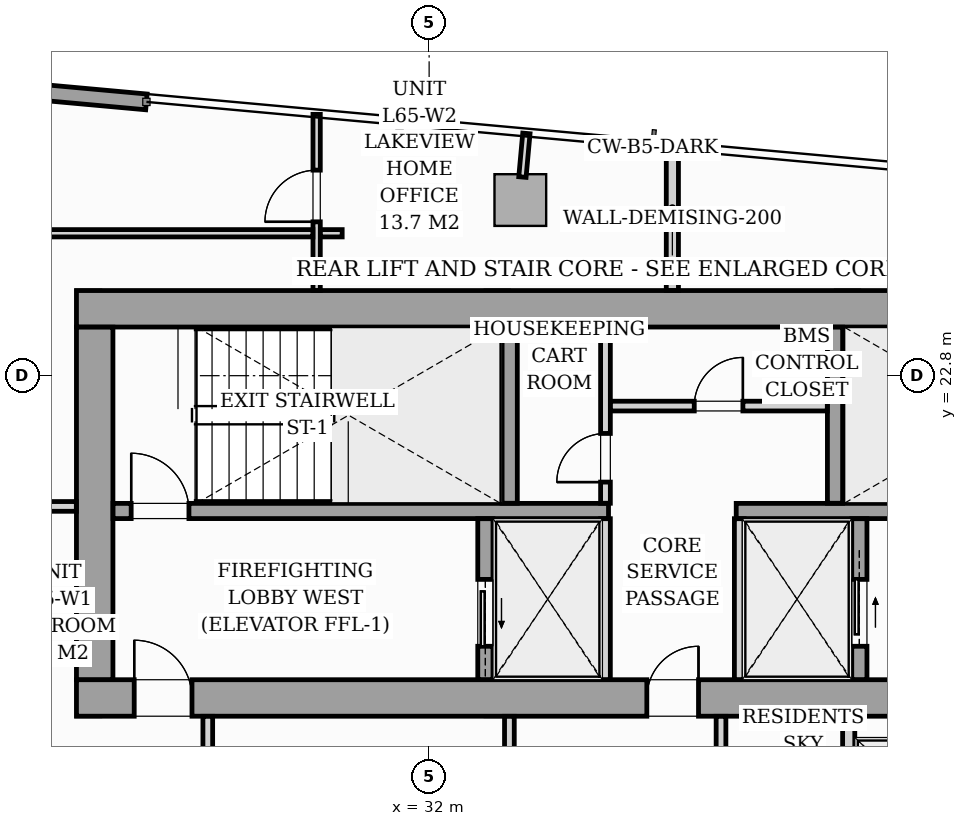
"""IFC4 building model, lengths in metres.
Left out: names, types, materials, properties, quantities, classifications, styles, units other than length and angle.
Written with IfcOpenShell. Run it as: python <this file> out.ifc"""

import sys

from ifc_helpers import new_model, si_unit, direction, frame, frame_2d, origin, origin_2d, place, context, subcontext, project, spatial, rectangle, i_section, extrude, source, transform, mapped, element, fill, save


model = new_model("IFC4")
c1 = context("Model", 3, precision=1e-05, world=origin(), true_north=direction((0.0, 1.0)))
c2 = subcontext(c1, "Body", "Model", "MODEL_VIEW")
j1 = project(units=[si_unit("LENGTHUNIT", "METRE"), si_unit("PLANEANGLEUNIT", "RADIAN")], contexts=[c1])
p1 = place(None, origin())
s1 = spatial("IfcSite", under=j1, at=p1, CompositionType="ELEMENT")
p2 = place(p1, origin())
s2 = spatial("IfcBuilding", under=s1, at=p2, CompositionType="ELEMENT")
p3 = place(p2, frame((0.0, 0.0, 226.5)))
s3 = spatial("IfcBuildingStorey", under=s2, at=p3, CompositionType="ELEMENT", Elevation=226.5)
m1 = source(origin(), c2, "Body", "SweptSolid", [
    extrude(i_section(OverallWidth=0.409, OverallDepth=0.425, WebThickness=0.033, FlangeThickness=0.052, FilletRadius=0.018, at=origin_2d()), origin(), (0.0, 0.0, 1.0), 3.296),
])
for number, where, z_axis, x_axis in (
    (1, (26.4, 17.4, 0.002), (0.0, 0.0, 1.0), (1.0, 0.0, 0.0)),
    (2, (33.12, 17.4, 0.002), (0.0, 0.0, 1.0), (1.0, 0.0, 0.0)),
    (3, (38.88, 17.4, 0.002), (0.0, 0.0, 1.0), (1.0, 0.0, 0.0)),
    (4, (26.4, 24.0, 0.002), (0.0, 0.0, 1.0), (1.0, 0.0, 0.0)),
    (5, (33.12, 24.0, 0.002), (0.0, 0.0, 1.0), (1.0, 0.0, 0.0)),
    (6, (38.88, 24.0, 0.002), (0.0, 0.0, 1.0), (1.0, 0.0, 0.0)),
):
    element("IfcColumn", number, at=place(p3, frame(where, z_axis=z_axis, x_axis=x_axis)), inside=s3, PredefinedType="PILASTER", context=c2, shape_type="MappedRepresentation", body=[
        mapped(m1, transform((0.0, 0.0, 0.0), scale=1.0)),
    ])
m2 = source(origin(), c2, "Body", "SweptSolid", [
    extrude(rectangle(XDim=0.85, YDim=0.85, at=origin_2d()), origin(), (0.0, 0.0, 1.0), 3.296),
])
p4 = place(p3, frame((33.5, 25.688, 0.002), z_axis=(0.0, 0.0, 1.0), x_axis=(0.995884398616, -0.090632580198, 0.0)))
e7 = element("IfcColumn", 7, at=p4, inside=s3, PredefinedType="COLUMN", context=c2, shape_type="MappedRepresentation", body=[
    mapped(m2, transform((0.0, 0.0, 0.0), scale=1.0)),
])
p5 = place(p3, frame((12.781, 28.628, 0.0), z_axis=(0.0, 0.0, 1.0), x_axis=(0.995884584572, -0.090630536861, 0.0)))
e8 = element("IfcWall", 8, at=p5, inside=s3, PredefinedType="STANDARD", context=c2, shape_type="SweptSolid", body=[
    extrude(rectangle(XDim=14.63, YDim=0.26, at=frame_2d((7.315, 0.0))), origin(), (0.0, 0.0, 1.0), 3.04),
])
p6 = place(p5, frame((4.173, 0.0, 0.0)))
e9 = element("IfcOpeningElement", 9, at=p6, cuts=e8, PredefinedType="OPENING", context=c2, shape_type="SweptSolid", body=[
    extrude(rectangle(XDim=1.8, YDim=2.06, at=frame_2d((0.9, 1.03))), frame((0.0, 0.14, 0.0), z_axis=(0.0, -1.0, 0.0), x_axis=(1.0, 0.0, 0.0)), (0.0, 0.0, 1.0), 0.28),
])
p7 = place(p5, frame((7.9, 0.0, 0.65)))
e10 = element("IfcOpeningElement", 10, at=p7, cuts=e8, PredefinedType="OPENING", context=c2, shape_type="SweptSolid", body=[
    extrude(rectangle(XDim=1.6, YDim=1.5, at=frame_2d((0.8, 0.75))), frame((0.0, 0.14, 0.0), z_axis=(0.0, -1.0, 0.0), x_axis=(1.0, 0.0, 0.0)), (0.0, 0.0, 1.0), 0.28),
])
p8 = place(p3, frame((26.2, 17.5, 0.0), z_axis=(0.0, 0.0, 1.0), x_axis=(1.0, 0.0, 0.0)))
e11 = element("IfcWall", 11, at=p8, inside=s3, PredefinedType="SHEAR", context=c2, shape_type="SweptSolid", body=[
    extrude(rectangle(XDim=19.6, YDim=0.6, at=frame_2d((9.8, 0.0))), origin(), (0.0, 0.0, 1.0), 3.3),
])
p9 = place(p8, frame((0.95, 0.0, 0.0)))
e12 = element("IfcOpeningElement", 12, at=p9, cuts=e11, PredefinedType="OPENING", context=c2, shape_type="SweptSolid", body=[
    extrude(rectangle(XDim=0.95, YDim=2.06, at=frame_2d((0.475, 1.03))), frame((0.0, 0.31, 0.0), z_axis=(0.0, -1.0, 0.0), x_axis=(1.0, 0.0, 0.0)), (0.0, 0.0, 1.0), 0.62),
])
p10 = place(p8, frame((9.38, 0.0, 0.0)))
e13 = element("IfcOpeningElement", 13, at=p10, cuts=e11, PredefinedType="OPENING", context=c2, shape_type="SweptSolid", body=[
    extrude(rectangle(XDim=0.85, YDim=2.0, at=frame_2d((0.425, 1.0))), frame((0.0, 0.31, 0.0), z_axis=(0.0, -1.0, 0.0), x_axis=(1.0, 0.0, 0.0)), (0.0, 0.0, 1.0), 0.62),
])
p11 = place(p8, frame((17.55, 0.0, 0.0)))
e14 = element("IfcOpeningElement", 14, at=p11, cuts=e11, PredefinedType="OPENING", context=c2, shape_type="SweptSolid", body=[
    extrude(rectangle(XDim=0.95, YDim=2.06, at=frame_2d((0.475, 1.03))), frame((0.0, 0.31, 0.0), z_axis=(0.0, -1.0, 0.0), x_axis=(1.0, 0.0, 0.0)), (0.0, 0.0, 1.0), 0.62),
])
p12 = place(p3, frame((26.2, 23.9, 0.0), z_axis=(0.0, 0.0, 1.0), x_axis=(1.0, 0.0, 0.0)))
e15 = element("IfcWall", 15, at=p12, inside=s3, PredefinedType="SHEAR", context=c2, shape_type="SweptSolid", body=[
    extrude(rectangle(XDim=19.6, YDim=0.6, at=frame_2d((9.8, 0.0))), origin(), (0.0, 0.0, 1.0), 3.3),
])
p13 = place(p3, frame((26.5, 17.802, 0.0), z_axis=(0.0, 0.0, 1.0), x_axis=(0.0, 1.0, 0.0)))
e16 = element("IfcWall", 16, at=p13, inside=s3, PredefinedType="SHEAR", context=c2, shape_type="SweptSolid", body=[
    extrude(rectangle(XDim=5.796, YDim=0.6, at=frame_2d((2.898, 0.0))), origin(), (0.0, 0.0, 1.0), 3.3),
])
p14 = place(p3, frame((26.802, 20.575, 0.0), z_axis=(0.0, 0.0, 1.0), x_axis=(1.0, 0.0, 0.0)))
e17 = element("IfcWall", 17, at=p14, inside=s3, PredefinedType="SOLIDWALL", context=c2, shape_type="SweptSolid", body=[
    extrude(rectangle(XDim=8.148, YDim=0.25, at=frame_2d((4.074, 0.0))), origin(), (0.0, 0.0, 1.0), 3.3),
])
p15 = place(p14, frame((0.298, 0.0, 0.0)))
e18 = element("IfcOpeningElement", 18, at=p15, cuts=e17, PredefinedType="OPENING", context=c2, shape_type="SweptSolid", body=[
    extrude(rectangle(XDim=0.95, YDim=2.06, at=frame_2d((0.475, 1.03))), frame((0.0, 0.135, 0.0), z_axis=(0.0, -1.0, 0.0), x_axis=(1.0, 0.0, 0.0)), (0.0, 0.0, 1.0), 0.27),
])
p16 = place(p3, frame((37.05, 20.575, 0.0), z_axis=(0.0, 0.0, 1.0), x_axis=(1.0, 0.0, 0.0)))
e19 = element("IfcWall", 19, at=p16, inside=s3, PredefinedType="SOLIDWALL", context=c2, shape_type="SweptSolid", body=[
    extrude(rectangle(XDim=8.148, YDim=0.25, at=frame_2d((4.074, 0.0))), origin(), (0.0, 0.0, 1.0), 3.3),
])
p17 = place(p16, frame((6.6, 0.0, 0.0)))
e20 = element("IfcOpeningElement", 20, at=p17, cuts=e19, PredefinedType="OPENING", context=c2, shape_type="SweptSolid", body=[
    extrude(rectangle(XDim=0.95, YDim=2.06, at=frame_2d((0.475, 1.03))), frame((0.0, 0.135, 0.0), z_axis=(0.0, -1.0, 0.0), x_axis=(1.0, 0.0, 0.0)), (0.0, 0.0, 1.0), 0.27),
])
for number, where, z_axis, x_axis in (
    (21, (33.325, 20.702, 0.0), (0.0, 0.0, 1.0), (0.0, 1.0, 0.0)),
    (22, (38.675, 20.702, 0.0), (0.0, 0.0, 1.0), (0.0, 1.0, 0.0)),
):
    element("IfcWall", number, at=place(p3, frame(where, z_axis=z_axis, x_axis=x_axis)), inside=s3, PredefinedType="SOLIDWALL", context=c2, shape_type="SweptSolid", body=[
        extrude(rectangle(XDim=2.896, YDim=0.25, at=frame_2d((1.448, 0.0))), origin(), (0.0, 0.0, 1.0), 3.3),
    ])
p18 = place(p3, frame((32.925, 17.802, 0.0), z_axis=(0.0, 0.0, 1.0), x_axis=(0.0, 1.0, 0.0)))
e23 = element("IfcWall", 23, at=p18, inside=s3, PredefinedType="SOLIDWALL", context=c2, shape_type="SweptSolid", body=[
    extrude(rectangle(XDim=2.646, YDim=0.25, at=frame_2d((1.323, 0.0))), origin(), (0.0, 0.0, 1.0), 3.3),
])
p19 = place(p18, frame((0.548, 0.0, 0.0)))
e24 = element("IfcOpeningElement", 24, at=p19, cuts=e23, PredefinedType="OPENING", context=c2, shape_type="SweptSolid", body=[
    extrude(rectangle(XDim=1.1, YDim=2.08, at=frame_2d((0.55, 1.04))), frame((0.0, 0.135, 0.0), z_axis=(0.0, -1.0, 0.0), x_axis=(1.0, 0.0, 0.0)), (0.0, 0.0, 1.0), 0.27),
])
for number, where, z_axis, x_axis in (
    (25, (34.9, 17.802, 0.0), (0.0, 0.0, 1.0), (0.0, 1.0, 0.0)),
    (26, (37.1, 17.802, 0.0), (0.0, 0.0, 1.0), (0.0, 1.0, 0.0)),
):
    element("IfcWall", number, at=place(p3, frame(where, z_axis=z_axis, x_axis=x_axis)), inside=s3, PredefinedType="PARTITIONING", context=c2, shape_type="SweptSolid", body=[
        extrude(rectangle(XDim=2.646, YDim=0.16, at=frame_2d((1.323, 0.0))), origin(), (0.0, 0.0, 1.0), 3.04),
    ])
p20 = place(p3, frame((39.075, 17.802, 0.0), z_axis=(0.0, 0.0, 1.0), x_axis=(0.0, 1.0, 0.0)))
e27 = element("IfcWall", 27, at=p20, inside=s3, PredefinedType="SOLIDWALL", context=c2, shape_type="SweptSolid", body=[
    extrude(rectangle(XDim=2.646, YDim=0.25, at=frame_2d((1.323, 0.0))), origin(), (0.0, 0.0, 1.0), 3.3),
])
p21 = place(p20, frame((0.548, 0.0, 0.0)))
e28 = element("IfcOpeningElement", 28, at=p21, cuts=e27, PredefinedType="OPENING", context=c2, shape_type="SweptSolid", body=[
    extrude(rectangle(XDim=1.1, YDim=2.08, at=frame_2d((0.55, 1.04))), frame((0.0, 0.135, 0.0), z_axis=(0.0, -1.0, 0.0), x_axis=(1.0, 0.0, 0.0)), (0.0, 0.0, 1.0), 0.27),
])
p22 = place(p3, frame((34.9, 20.702, 0.0), z_axis=(0.0, 0.0, 1.0), x_axis=(0.0, 1.0, 0.0)))
e29 = element("IfcWall", 29, at=p22, inside=s3, PredefinedType="PARTITIONING", context=c2, shape_type="SweptSolid", body=[
    extrude(rectangle(XDim=2.896, YDim=0.16, at=frame_2d((1.448, 0.0))), origin(), (0.0, 0.0, 1.0), 3.04),
])
p23 = place(p22, frame((0.348, 0.0, 0.0)))
e30 = element("IfcOpeningElement", 30, at=p23, cuts=e29, PredefinedType="OPENING", context=c2, shape_type="SweptSolid", body=[
    extrude(rectangle(XDim=0.8, YDim=2.05, at=frame_2d((0.4, 1.025))), frame((0.0, 0.09, 0.0), z_axis=(0.0, -1.0, 0.0), x_axis=(1.0, 0.0, 0.0)), (0.0, 0.0, 1.0), 0.18),
])
p24 = place(p3, frame((34.982, 22.3, 0.0), z_axis=(0.0, 0.0, 1.0), x_axis=(1.0, 0.0, 0.0)))
e31 = element("IfcWall", 31, at=p24, inside=s3, PredefinedType="PARTITIONING", context=c2, shape_type="SweptSolid", body=[
    extrude(rectangle(XDim=3.566, YDim=0.16, at=frame_2d((1.783, 0.0))), origin(), (0.0, 0.0, 1.0), 3.04),
])
p25 = place(p24, frame((1.378, 0.0, 0.0)))
e32 = element("IfcOpeningElement", 32, at=p25, cuts=e31, PredefinedType="OPENING", context=c2, shape_type="SweptSolid", body=[
    extrude(rectangle(XDim=0.8, YDim=2.05, at=frame_2d((0.4, 1.025))), frame((0.0, 0.09, 0.0), z_axis=(0.0, -1.0, 0.0), x_axis=(1.0, 0.0, 0.0)), (0.0, 0.0, 1.0), 0.18),
])
p26 = place(p3, frame((38.9, 14.75, 0.0), z_axis=(0.0, 0.0, 1.0), x_axis=(0.0, 1.0, 0.0)))
e33 = element("IfcWall", 33, at=p26, inside=s3, PredefinedType="PARTITIONING", context=c2, shape_type="SweptSolid", body=[
    extrude(rectangle(XDim=2.35, YDim=0.2, at=frame_2d((1.175, 0.0))), origin(), (0.0, 0.0, 1.0), 3.04),
])
p27 = place(p3, frame((36.0, 24.202, 0.0), z_axis=(0.0, 0.0, 1.0), x_axis=(0.0, 1.0, 0.0)))
e34 = element("IfcWall", 34, at=p27, inside=s3, PredefinedType="PARTITIONING", context=c2, shape_type="SweptSolid", body=[
    extrude(rectangle(XDim=2.363, YDim=0.2, at=frame_2d((1.182, 0.0))), origin(), (0.0, 0.0, 1.0), 3.04),
])
p28 = place(p3, frame((24.632, 20.65, 0.0), z_axis=(0.0, 0.0, 1.0), x_axis=(1.0, 0.0, 0.0)))
e35 = element("IfcWall", 35, at=p28, inside=s3, PredefinedType="PARTITIONING", context=c2, shape_type="SweptSolid", body=[
    extrude(rectangle(XDim=1.566, YDim=0.16, at=frame_2d((0.783, 0.0))), origin(), (0.0, 0.0, 1.0), 3.04),
])
p29 = place(p3, frame((30.15, 24.202, 0.0), z_axis=(0.0, 0.0, 1.0), x_axis=(0.0, 1.0, 0.0)))
e36 = element("IfcWall", 36, at=p29, inside=s3, PredefinedType="PARTITIONING", context=c2, shape_type="SweptSolid", body=[
    extrude(rectangle(XDim=2.896, YDim=0.12, at=frame_2d((1.448, 0.0))), origin(), (0.0, 0.0, 1.0), 3.04),
])
p30 = place(p29, frame((1.128, 0.0, 0.0)))
e37 = element("IfcOpeningElement", 37, at=p30, cuts=e36, PredefinedType="OPENING", context=c2, shape_type="SweptSolid", body=[
    extrude(rectangle(XDim=0.85, YDim=2.05, at=frame_2d((0.425, 1.025))), frame((0.0, 0.07, 0.0), z_axis=(0.0, -1.0, 0.0), x_axis=(1.0, 0.0, 0.0)), (0.0, 0.0, 1.0), 0.14),
])
p31 = place(p3, frame((20.107, 25.142, 0.0), z_axis=(0.0, 0.0, 1.0), x_axis=(1.0, 0.0, 0.0)))
e38 = element("IfcWall", 38, at=p31, inside=s3, PredefinedType="PARTITIONING", context=c2, shape_type="SweptSolid", body=[
    extrude(rectangle(XDim=9.981, YDim=0.12, at=frame_2d((4.99, 0.0))), origin(), (0.0, 0.0, 1.0), 3.04),
])
p32 = place(p31, frame((4.526, 0.0, 0.0)))
e39 = element("IfcOpeningElement", 39, at=p32, cuts=e38, PredefinedType="OPENING", context=c2, shape_type="SweptSolid", body=[
    extrude(rectangle(XDim=0.85, YDim=2.05, at=frame_2d((0.425, 1.025))), frame((0.0, 0.07, 0.0), z_axis=(0.0, -1.0, 0.0), x_axis=(1.0, 0.0, 0.0)), (0.0, 0.0, 1.0), 0.14),
])
p33 = place(p3, frame((30.212, 25.142, 0.0), z_axis=(0.0, 0.0, 1.0), x_axis=(1.0, 0.0, 0.0)))
e40 = element("IfcWall", 40, at=p33, inside=s3, PredefinedType="PARTITIONING", context=c2, shape_type="SweptSolid", body=[
    extrude(rectangle(XDim=0.358, YDim=0.12, at=frame_2d((0.179, 0.0))), origin(), (0.0, 0.0, 1.0), 3.04),
])
for number, where, z_axis, x_axis in (
    (41, (28.36, 14.7, 0.0), (0.0, 0.0, 1.0), (0.0, 1.0, 0.0)),
    (42, (33.32, 14.7, 0.0), (0.0, 0.0, 1.0), (0.0, 1.0, 0.0)),
    (43, (36.8, 14.7, 0.0), (0.0, 0.0, 1.0), (0.0, 1.0, 0.0)),
):
    element("IfcWall", number, at=place(p3, frame(where, z_axis=z_axis, x_axis=x_axis)), inside=s3, PredefinedType="PARTITIONING", context=c2, shape_type="SweptSolid", body=[
        extrude(rectangle(XDim=2.498, YDim=0.16, at=frame_2d((1.249, 0.0))), origin(), (0.0, 0.0, 1.0), 3.04),
    ])
p34 = place(p3, frame((33.534, 26.067, 0.0), z_axis=(0.0, 0.0, 1.0), x_axis=(0.090535746043, 0.995893206468, 0.0)))
e44 = element("IfcWall", 44, at=p34, inside=s3, PredefinedType="PARTITIONING", context=c2, shape_type="SweptSolid", body=[
    extrude(rectangle(XDim=0.72, YDim=0.12, at=frame_2d((0.36, 0.0))), origin(), (0.0, 0.0, 1.0), 3.04),
])
m3 = source(origin(), c2, "Body", "SweptSolid", [
    extrude(rectangle(XDim=0.95, YDim=2.06, at=frame_2d((0.475, 1.03))), frame((0.0, 0.025, 0.0), z_axis=(0.0, -1.0, 0.0), x_axis=(1.0, 0.0, 0.0)), (0.0, 0.0, 1.0), 0.05),
])
p35 = place(p9, origin())
e45 = element("IfcDoor", 45, at=p35, inside=s3, OperationType="SINGLE_SWING_LEFT", PredefinedType="DOOR", context=c2, shape_type="MappedRepresentation", body=[
    mapped(m3, transform((0.0, 0.0, 0.0), scale=1.0)),
])
fill(e12, e45)
m4 = source(origin(), c2, "Body", "SweptSolid", [
    extrude(rectangle(XDim=0.85, YDim=2.0, at=frame_2d((0.425, 1.0))), frame((0.0, 0.025, 0.0), z_axis=(0.0, -1.0, 0.0), x_axis=(1.0, 0.0, 0.0)), (0.0, 0.0, 1.0), 0.05),
])
p36 = place(p10, origin())
e46 = element("IfcDoor", 46, at=p36, inside=s3, OperationType="SINGLE_SWING_RIGHT", PredefinedType="DOOR", context=c2, shape_type="MappedRepresentation", body=[
    mapped(m4, transform((0.0, 0.0, 0.0), scale=1.0)),
])
fill(e13, e46)
p37 = place(p15, origin())
e47 = element("IfcDoor", 47, at=p37, inside=s3, OperationType="SINGLE_SWING_LEFT", PredefinedType="DOOR", context=c2, shape_type="MappedRepresentation", body=[
    mapped(m3, transform((0.0, 0.0, 0.0), scale=1.0)),
])
fill(e18, e47)
m5 = source(origin(), c2, "Body", "SweptSolid", [
    extrude(rectangle(XDim=1.1, YDim=2.08, at=frame_2d((0.55, 1.04))), frame((0.0, 0.025, 0.0), z_axis=(0.0, -1.0, 0.0), x_axis=(1.0, 0.0, 0.0)), (0.0, 0.0, 1.0), 0.05),
])
p38 = place(p19, origin())
e48 = element("IfcDoor", 48, at=p38, inside=s3, OperationType="SLIDING_TO_LEFT", PredefinedType="DOOR", context=c2, shape_type="MappedRepresentation", body=[
    mapped(m5, transform((0.0, 0.0, 0.0), scale=1.0)),
])
fill(e24, e48)
p39 = place(p21, origin())
e49 = element("IfcDoor", 49, at=p39, inside=s3, OperationType="SLIDING_TO_RIGHT", PredefinedType="DOOR", context=c2, shape_type="MappedRepresentation", body=[
    mapped(m5, transform((0.0, 0.0, 0.0), scale=1.0)),
])
fill(e28, e49)
m6 = source(origin(), c2, "Body", "SweptSolid", [
    extrude(rectangle(XDim=0.8, YDim=2.05, at=frame_2d((0.4, 1.025))), frame((0.0, 0.025, 0.0), z_axis=(0.0, -1.0, 0.0), x_axis=(1.0, 0.0, 0.0)), (0.0, 0.0, 1.0), 0.05),
])
p40 = place(p23, origin())
e50 = element("IfcDoor", 50, at=p40, inside=s3, OperationType="SINGLE_SWING_LEFT", PredefinedType="DOOR", context=c2, shape_type="MappedRepresentation", body=[
    mapped(m6, transform((0.0, 0.0, 0.0), scale=1.0)),
])
fill(e30, e50)
p41 = place(p25, origin())
e51 = element("IfcDoor", 51, at=p41, inside=s3, OperationType="SINGLE_SWING_RIGHT", PredefinedType="DOOR", context=c2, shape_type="MappedRepresentation", body=[
    mapped(m6, transform((0.0, 0.0, 0.0), scale=1.0)),
])
fill(e32, e51)
m7 = source(origin(), c2, "Body", "SweptSolid", [
    extrude(rectangle(XDim=0.85, YDim=2.05, at=frame_2d((0.425, 1.025))), frame((0.0, 0.025, 0.0), z_axis=(0.0, -1.0, 0.0), x_axis=(1.0, 0.0, 0.0)), (0.0, 0.0, 1.0), 0.05),
])
p42 = place(p30, origin())
e52 = element("IfcDoor", 52, at=p42, inside=s3, OperationType="SINGLE_SWING_LEFT", PredefinedType="DOOR", context=c2, shape_type="MappedRepresentation", body=[
    mapped(m7, transform((0.0, 0.0, 0.0), scale=1.0)),
])
fill(e37, e52)
save(model, sys.argv[1])
